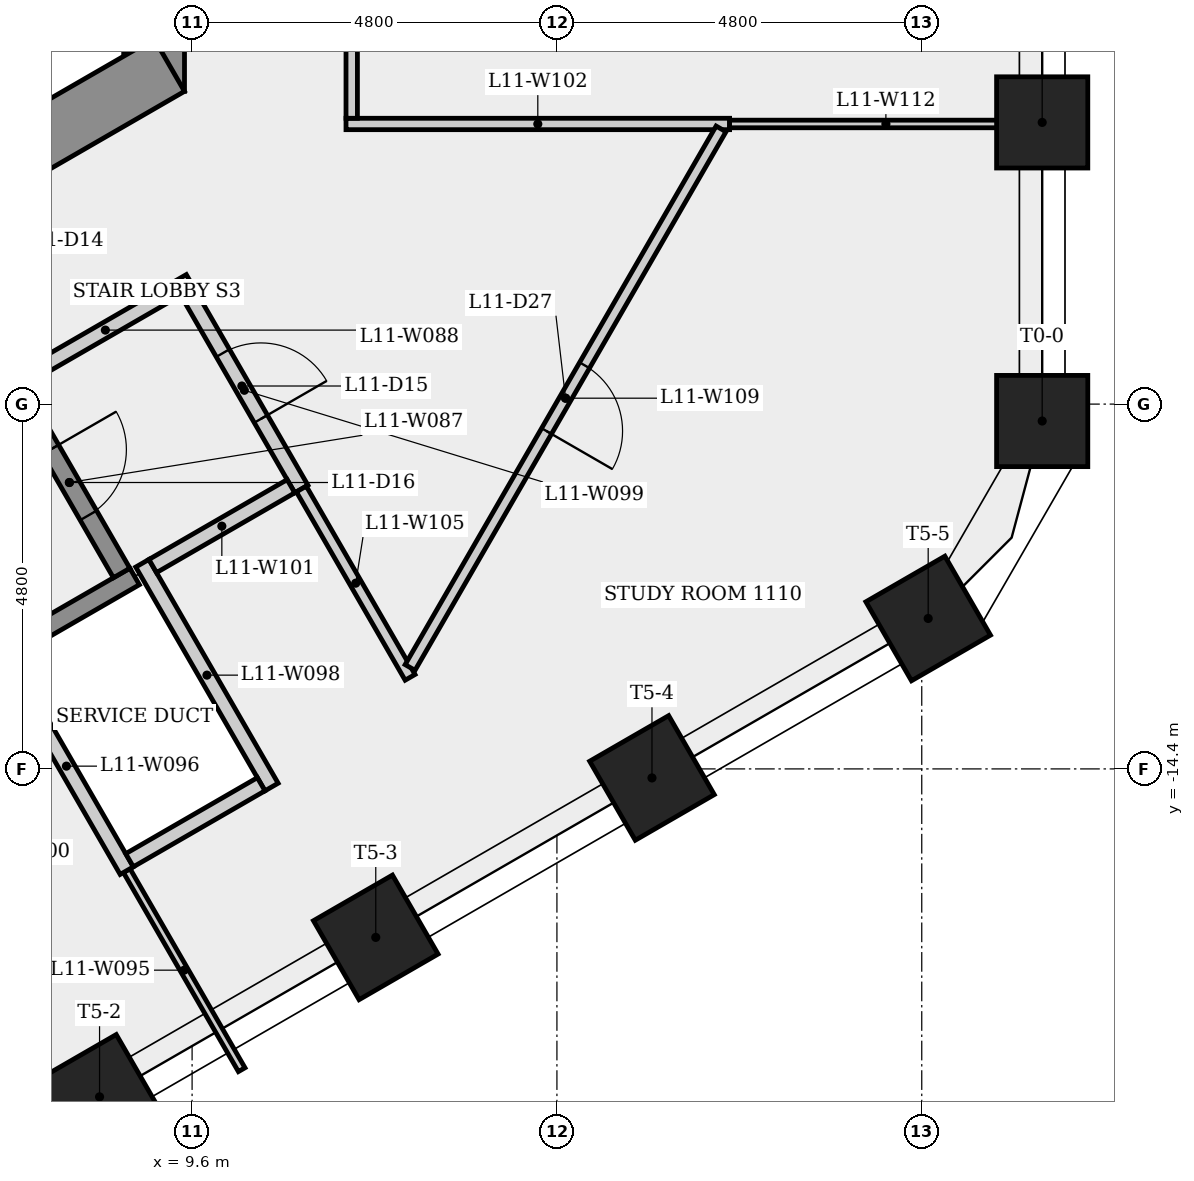
"""IFC4 building model, lengths in metres.
Left out: names, types, materials, properties, quantities, classifications, styles, units other than length and angle.
Written with IfcOpenShell. Run it as: python <this file> out.ifc"""

import sys

from ifc_helpers import new_model, si_unit, direction, frame, frame_2d, origin, origin_2d, place, context, subcontext, project, spatial, rectangle, extrude, element, fill, save


model = new_model("IFC4")
c1 = context("Model", 3, precision=1e-05, world=origin(), true_north=direction((0.0, 1.0)))
c2 = subcontext(c1, "Body", "Model", "MODEL_VIEW")
j1 = project(units=[si_unit("LENGTHUNIT", "METRE"), si_unit("PLANEANGLEUNIT", "RADIAN")], contexts=[c1])
p1 = place(None, origin())
s1 = spatial("IfcSite", under=j1, at=p1, CompositionType="ELEMENT")
p2 = place(p1, origin())
s2 = spatial("IfcBuilding", under=s1, at=p2, CompositionType="ELEMENT")
p3 = place(p2, frame((0.0, 0.0, 45.9)))
s3 = spatial("IfcBuildingStorey", under=s2, at=p3, CompositionType="ELEMENT", Elevation=45.9)
p4 = place(p3, frame((9.1, -5.485, 0.0), z_axis=(0.0, 0.0, 1.0), x_axis=(0.0, 1.0, 0.0)))
e1 = element("IfcWall", 1, at=p4, inside=s3, PredefinedType="SHEAR", context=c2, shape_type="SweptSolid", body=[
    extrude(rectangle(XDim=10.97, YDim=0.8, at=frame_2d((5.485, 0.0))), origin(), (0.0, 0.0, 1.0), 3.4),
])
p5 = place(p4, frame((4.685, 0.0, 0.0)))
e2 = element("IfcOpeningElement", 2, at=p5, cuts=e1, PredefinedType="OPENING", context=c2, shape_type="SweptSolid", body=[
    extrude(rectangle(XDim=1.6, YDim=2.1, at=frame_2d((0.8, 1.05))), frame((0.0, 0.41, 0.0), z_axis=(0.0, -1.0, 0.0), x_axis=(1.0, 0.0, 0.0)), (0.0, 0.0, 1.0), 0.82),
])
p6 = place(p3, frame((-0.2, -10.623, 0.0), z_axis=(0.0, 0.0, 1.0), x_axis=(0.866023993627, 0.500002442456, 0.0)))
e3 = element("IfcWall", 3, at=p6, inside=s3, PredefinedType="SHEAR", context=c2, shape_type="SweptSolid", body=[
    extrude(rectangle(XDim=10.97, YDim=0.8, at=frame_2d((5.485, 0.0))), origin(), (0.0, 0.0, 1.0), 3.4),
])
p7 = place(p6, frame((7.108, 0.0, 0.0)))
e4 = element("IfcOpeningElement", 4, at=p7, cuts=e3, PredefinedType="OPENING", context=c2, shape_type="SweptSolid", body=[
    extrude(rectangle(XDim=0.9, YDim=2.1, at=frame_2d((0.45, 1.05))), frame((0.0, 0.41, 0.0), z_axis=(0.0, -1.0, 0.0), x_axis=(1.0, 0.0, 0.0)), (0.0, 0.0, 1.0), 0.82),
])
for number, where, z_axis, x_axis in (
    (5, (20.785, -9.823, 0.0), (0.0, 0.0, 1.0), (1.0, 0.0, 0.0)),
    (6, (20.785, -5.894, 0.0), (0.0, 0.0, 1.0), (1.0, 0.0, 0.0)),
    (7, (8.382, -18.715, 0.0), (0.0, 0.0, 1.0), (0.5, -0.866, 0.0)),
    (8, (12.016, -16.617, 0.0), (0.0, 0.0, 1.0), (0.5, -0.866, 0.0)),
    (9, (15.651, -14.519, 0.0), (0.0, 0.0, 1.0), (0.5, -0.866, 0.0)),
    (10, (19.285, -12.421, 0.0), (0.0, 0.0, 1.0), (0.5, -0.866, 0.0)),
):
    element("IfcColumn", number, at=place(p3, frame(where, z_axis=z_axis, x_axis=x_axis)), inside=s3, PredefinedType="COLUMN", context=c2, shape_type="SweptSolid", body=[
        extrude(rectangle(XDim=1.2, YDim=1.2, at=origin_2d()), origin(), (0.0, 0.0, 1.0), 3.4),
    ])
p8 = place(p3, frame((3.301, -15.068, 0.0), z_axis=(0.0, 0.0, 1.0), x_axis=(0.866035036182, 0.499983315828, 0.0)))
e11 = element("IfcWall", 11, at=p8, inside=s3, PredefinedType="SHEAR", context=c2, shape_type="SweptSolid", body=[
    extrude(rectangle(XDim=6.4, YDim=0.25, at=frame_2d((3.2, 0.0))), origin(), (0.0, 0.0, 1.0), 3.05),
])
p9 = place(p3, frame((7.298, -9.441, 0.0), z_axis=(0.0, 0.0, 1.0), x_axis=(0.500034990121, -0.866005201286, 0.0)))
e12 = element("IfcWall", 12, at=p9, inside=s3, PredefinedType="SHEAR", context=c2, shape_type="SweptSolid", body=[
    extrude(rectangle(XDim=2.75, YDim=0.25, at=frame_2d((1.375, 0.0))), origin(), (0.0, 0.0, 1.0), 3.05),
])
p10 = place(p9, frame((0.875, 0.0, 0.0)))
e13 = element("IfcOpeningElement", 13, at=p10, cuts=e12, PredefinedType="OPENING", context=c2, shape_type="SweptSolid", body=[
    extrude(rectangle(XDim=1.0, YDim=2.1, at=frame_2d((0.5, 1.05))), frame((0.0, 0.135, 0.0), z_axis=(0.0, -1.0, 0.0), x_axis=(1.0, 0.0, 0.0)), (0.0, 0.0, 1.0), 0.27),
])
p11 = place(p3, frame((7.344, -9.27, 0.0), z_axis=(0.0, 0.0, 1.0), x_axis=(0.866005588531, 0.500034319456, 0.0)))
e14 = element("IfcWall", 14, at=p11, inside=s3, PredefinedType="PARTITIONING", context=c2, shape_type="SweptSolid", body=[
    extrude(rectangle(XDim=2.575, YDim=0.2, at=frame_2d((1.288, 0.0))), origin(), (0.0, 0.0, 1.0), 3.05),
])
p12 = place(p3, frame((8.74, -15.738, 0.0), z_axis=(0.0, 0.0, 1.0), x_axis=(0.500001913541, -0.866024298998, 0.0)))
e15 = element("IfcWall", 15, at=p12, inside=s3, PredefinedType="PARTITIONING", context=c2, shape_type="SweptSolid", body=[
    extrude(rectangle(XDim=3.025, YDim=0.1, at=frame_2d((1.512, 0.0))), origin(), (0.0, 0.0, 1.0), 3.05),
])
p13 = place(p3, frame((8.74, -15.739, 0.0), z_axis=(0.0, 0.0, 1.0), x_axis=(-0.500017526161, 0.866015284814, 0.0)))
e16 = element("IfcWall", 16, at=p13, inside=s3, PredefinedType="PLUMBINGWALL", context=c2, shape_type="SweptSolid", body=[
    extrude(rectangle(XDim=3.175, YDim=0.2, at=frame_2d((1.588, 0.0))), origin(), (0.0, 0.0, 1.0), 3.05),
])
p14 = place(p3, frame((8.945, -11.694, 0.0), z_axis=(0.0, 0.0, 1.0), x_axis=(0.500062241894, -0.865989465428, 0.0)))
e17 = element("IfcWall", 17, at=p14, inside=s3, PredefinedType="PLUMBINGWALL", context=c2, shape_type="SweptSolid", body=[
    extrude(rectangle(XDim=3.4, YDim=0.2, at=frame_2d((1.7, 0.0))), origin(), (0.0, 0.0, 1.0), 3.05),
])
p15 = place(p3, frame((9.537, -8.119, 0.0), z_axis=(0.0, 0.0, 1.0), x_axis=(0.499990139034, -0.866031096941, 0.0)))
e18 = element("IfcWall", 18, at=p15, inside=s3, PredefinedType="PARTITIONING", context=c2, shape_type="SweptSolid", body=[
    extrude(rectangle(XDim=3.0, YDim=0.2, at=frame_2d((1.5, 0.0))), origin(), (0.0, 0.0, 1.0), 3.05),
])
p16 = place(p15, frame((0.935, 0.0, 0.0)))
e19 = element("IfcOpeningElement", 19, at=p16, cuts=e18, PredefinedType="OPENING", context=c2, shape_type="SweptSolid", body=[
    extrude(rectangle(XDim=1.0, YDim=2.1, at=frame_2d((0.5, 1.05))), frame((0.0, 0.11, 0.0), z_axis=(0.0, -1.0, 0.0), x_axis=(1.0, 0.0, 0.0)), (0.0, 0.0, 1.0), 0.22),
])
p17 = place(p3, frame((10.509, -14.602, 0.0), z_axis=(0.0, 0.0, 1.0), x_axis=(-0.866010750942, -0.50002537861, 0.0)))
e20 = element("IfcWall", 20, at=p17, inside=s3, PredefinedType="PLUMBINGWALL", context=c2, shape_type="SweptSolid", body=[
    extrude(rectangle(XDim=2.0, YDim=0.2, at=frame_2d((1.0, 0.0))), origin(), (0.0, 0.0, 1.0), 3.05),
])
p18 = place(p3, frame((10.901, -10.681, 0.0), z_axis=(0.0, 0.0, 1.0), x_axis=(-0.866009402589, -0.500027713859, 0.0)))
e21 = element("IfcWall", 21, at=p18, inside=s3, PredefinedType="PARTITIONING", context=c2, shape_type="SweptSolid", body=[
    extrude(rectangle(XDim=2.1, YDim=0.2, at=frame_2d((1.05, 0.0))), origin(), (0.0, 0.0, 1.0), 3.05),
])
p19 = place(p3, frame((11.625, -5.914, 0.0), z_axis=(0.0, 0.0, 1.0), x_axis=(1.0, 0.0, 0.0)))
e22 = element("IfcWall", 22, at=p19, inside=s3, PredefinedType="PARTITIONING", context=c2, shape_type="SweptSolid", body=[
    extrude(rectangle(XDim=5.047, YDim=0.15, at=frame_2d((2.523, 0.0))), origin(), (0.0, 0.0, 1.0), 3.05),
])
p20 = place(p3, frame((11.7, 5.914, 0.0), z_axis=(0.0, 0.0, 1.0), x_axis=(0.0, -1.0, 0.0)))
e23 = element("IfcWall", 23, at=p20, inside=s3, PredefinedType="PARTITIONING", context=c2, shape_type="SweptSolid", body=[
    extrude(rectangle(XDim=11.753, YDim=0.15, at=frame_2d((5.877, 0.0))), origin(), (0.0, 0.0, 1.0), 3.05),
])
p21 = place(p20, frame((5.377, 0.0, 0.0)))
e24 = element("IfcOpeningElement", 24, at=p21, cuts=e23, PredefinedType="OPENING", context=c2, shape_type="SweptSolid", body=[
    extrude(rectangle(XDim=1.0, YDim=2.1, at=frame_2d((0.5, 1.05))), frame((0.0, 0.085, 0.0), z_axis=(0.0, -1.0, 0.0), x_axis=(1.0, 0.0, 0.0)), (0.0, 0.0, 1.0), 0.17),
])
p22 = place(p3, frame((12.468, -13.195, 0.0), z_axis=(0.0, 0.0, 1.0), x_axis=(-0.499956322556, 0.8660506195, 0.0)))
e25 = element("IfcWall", 25, at=p22, inside=s3, PredefinedType="PARTITIONING", context=c2, shape_type="SweptSolid", body=[
    extrude(rectangle(XDim=2.862, YDim=0.15, at=frame_2d((1.431, 0.0))), origin(), (0.0, 0.0, 1.0), 3.05),
])
p23 = place(p3, frame((16.559, -5.979, 0.0), z_axis=(0.0, 0.0, 1.0), x_axis=(-0.499996220184, -0.866027586051, 0.0)))
e26 = element("IfcWall", 26, at=p23, inside=s3, PredefinedType="PARTITIONING", context=c2, shape_type="SweptSolid", body=[
    extrude(rectangle(XDim=8.183, YDim=0.15, at=frame_2d((4.091, 0.0))), origin(), (0.0, 0.0, 1.0), 3.05),
])
p24 = place(p23, frame((3.591, 0.0, 0.0)))
e27 = element("IfcOpeningElement", 27, at=p24, cuts=e26, PredefinedType="OPENING", context=c2, shape_type="SweptSolid", body=[
    extrude(rectangle(XDim=1.0, YDim=2.1, at=frame_2d((0.5, 1.05))), frame((0.0, 0.085, 0.0), z_axis=(0.0, -1.0, 0.0), x_axis=(1.0, 0.0, 0.0)), (0.0, 0.0, 1.0), 0.17),
])
p25 = place(p3, frame((20.785, -5.914, 0.0), z_axis=(0.0, 0.0, 1.0), x_axis=(-1.0, 0.0, 0.0)))
e28 = element("IfcWall", 28, at=p25, inside=s3, PredefinedType="PARTITIONING", context=c2, shape_type="SweptSolid", body=[
    extrude(rectangle(XDim=4.113, YDim=0.1, at=frame_2d((2.057, 0.0))), origin(), (0.0, 0.0, 1.0), 3.05),
])
p26 = place(p16, origin())
e29 = element("IfcDoor", 29, at=p26, inside=s3, OperationType="SINGLE_SWING_RIGHT", PredefinedType="DOOR", context=c2, shape_type="SweptSolid", body=[
    extrude(rectangle(XDim=1.0, YDim=2.1, at=frame_2d((0.5, 1.05))), frame((0.0, 0.025, 0.0), z_axis=(0.0, -1.0, 0.0), x_axis=(1.0, 0.0, 0.0)), (0.0, 0.0, 1.0), 0.05),
])
fill(e19, e29)
p27 = place(p10, origin())
e30 = element("IfcDoor", 30, at=p27, inside=s3, OperationType="SINGLE_SWING_LEFT", PredefinedType="DOOR", context=c2, shape_type="SweptSolid", body=[
    extrude(rectangle(XDim=1.0, YDim=2.1, at=frame_2d((0.5, 1.05))), frame((0.0, 0.025, 0.0), z_axis=(0.0, -1.0, 0.0), x_axis=(1.0, 0.0, 0.0)), (0.0, 0.0, 1.0), 0.05),
])
fill(e13, e30)
p28 = place(p24, origin())
e31 = element("IfcDoor", 31, at=p28, inside=s3, OperationType="SINGLE_SWING_RIGHT", PredefinedType="DOOR", context=c2, shape_type="SweptSolid", body=[
    extrude(rectangle(XDim=1.0, YDim=2.1, at=frame_2d((0.5, 1.05))), frame((0.0, 0.025, 0.0), z_axis=(0.0, -1.0, 0.0), x_axis=(1.0, 0.0, 0.0)), (0.0, 0.0, 1.0), 0.05),
])
fill(e27, e31)
save(model, sys.argv[1])
